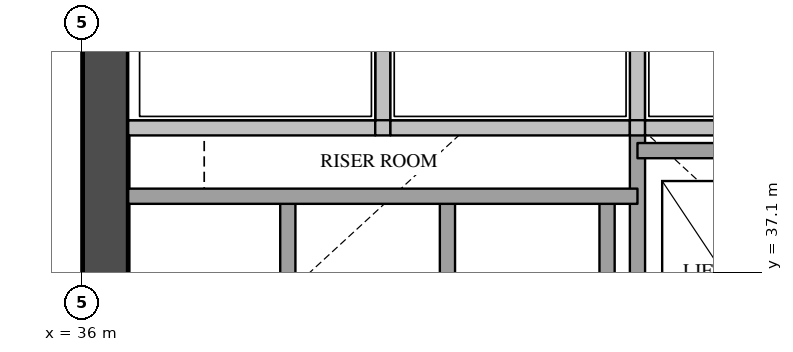
"""IFC4 building model, lengths in metres.
Left out: names, types, materials, properties, quantities, classifications, styles, units other than length and angle.
Written with IfcOpenShell. Run it as: python <this file> out.ifc"""

import sys

from ifc_helpers import new_model, si_unit, direction, frame, frame_2d, origin, place, context, subcontext, project, spatial, rectangle, extrude, element, save


model = new_model("IFC4")
c1 = context("Model", 3, precision=1e-05, world=origin(), true_north=direction((0.0, 1.0)))
c2 = subcontext(c1, "Body", "Model", "MODEL_VIEW")
j1 = project(units=[si_unit("LENGTHUNIT", "METRE"), si_unit("PLANEANGLEUNIT", "RADIAN")], contexts=[c1])
p1 = place(None, origin())
s1 = spatial("IfcSite", under=j1, at=p1, CompositionType="ELEMENT")
p2 = place(p1, origin())
s2 = spatial("IfcBuilding", under=s1, at=p2, CompositionType="ELEMENT")
p3 = place(p2, frame((0.0, 0.0, 89.2)))
s3 = spatial("IfcBuildingStorey", under=s2, at=p3, CompositionType="ELEMENT", Elevation=89.2)
p4 = place(p3, frame((36.3, 29.1, 0.0), z_axis=(0.0, 0.0, 1.0), x_axis=(0.0, 1.0, 0.0)))
e1 = element("IfcWall", 1, at=p4, inside=s3, PredefinedType="SHEAR", context=c2, shape_type="SweptSolid", body=[
    extrude(rectangle(XDim=20.3, YDim=0.6, at=frame_2d((10.15, 0.0))), origin(), (0.0, 0.0, 1.0), 3.5),
])
p5 = place(p4, frame((3.6, 0.0, 0.0)))
e2 = element("IfcOpeningElement", 2, at=p5, cuts=e1, PredefinedType="OPENING", context=c2, shape_type="SweptSolid", body=[
    extrude(rectangle(XDim=1.8, YDim=2.1, at=frame_2d((0.9, 1.05))), frame((0.0, 0.31, 0.0), z_axis=(0.0, -1.0, 0.0), x_axis=(1.0, 0.0, 0.0)), (0.0, 0.0, 1.0), 0.62),
])
p6 = place(p4, frame((16.4, 0.0, 0.0)))
e3 = element("IfcOpeningElement", 3, at=p6, cuts=e1, PredefinedType="OPENING", context=c2, shape_type="SweptSolid", body=[
    extrude(rectangle(XDim=1.0, YDim=2.1, at=frame_2d((0.5, 1.05))), frame((0.0, 0.31, 0.0), z_axis=(0.0, -1.0, 0.0), x_axis=(1.0, 0.0, 0.0)), (0.0, 0.0, 1.0), 0.62),
])
p7 = place(p3, frame((38.7, 34.9, 0.0), z_axis=(0.0, 0.0, 1.0), x_axis=(0.0, 1.0, 0.0)))
e4 = element("IfcWall", 4, at=p7, inside=s3, PredefinedType="SOLIDWALL", context=c2, shape_type="SweptSolid", body=[
    extrude(rectangle(XDim=3.2, YDim=0.2, at=frame_2d((1.6, 0.0))), origin(), (0.0, 0.0, 1.0), 3.5),
])
p8 = place(p3, frame((39.95, 39.0, 0.0), z_axis=(0.0, 0.0, 1.0), x_axis=(0.0, 1.0, 0.0)))
e5 = element("IfcWall", 5, at=p8, inside=s3, PredefinedType="SOLIDWALL", context=c2, shape_type="SweptSolid", body=[
    extrude(rectangle(XDim=1.78, YDim=0.2, at=frame_2d((0.89, 0.0))), origin(), (0.0, 0.0, 1.0), 3.5),
])
for number, where, z_axis, x_axis in (
    (6, (40.8, 34.9, 0.0), (0.0, 0.0, 1.0), (0.0, 1.0, 0.0)),
    (7, (42.9, 34.9, 0.0), (0.0, 0.0, 1.0), (0.0, 1.0, 0.0)),
):
    element("IfcWall", number, at=place(p3, frame(where, z_axis=z_axis, x_axis=x_axis)), inside=s3, PredefinedType="SOLIDWALL", context=c2, shape_type="SweptSolid", body=[
        extrude(rectangle(XDim=3.2, YDim=0.2, at=frame_2d((1.6, 0.0))), origin(), (0.0, 0.0, 1.0), 3.5),
    ])
p9 = place(p3, frame((43.3, 29.1, 0.0), z_axis=(0.0, 0.0, 1.0), x_axis=(0.0, 1.0, 0.0)))
e8 = element("IfcWall", 8, at=p9, inside=s3, PredefinedType="SOLIDWALL", context=c2, shape_type="SweptSolid", body=[
    extrude(rectangle(XDim=9.9, YDim=0.2, at=frame_2d((4.95, 0.0))), origin(), (0.0, 0.0, 1.0), 3.5),
])
p10 = place(p3, frame((43.3, 39.0, 0.0), z_axis=(0.0, 0.0, 1.0), x_axis=(0.0, 1.0, 0.0)))
e9 = element("IfcWall", 9, at=p10, inside=s3, PredefinedType="SOLIDWALL", context=c2, shape_type="SweptSolid", body=[
    extrude(rectangle(XDim=1.78, YDim=0.2, at=frame_2d((0.89, 0.0))), origin(), (0.0, 0.0, 1.0), 3.5),
])
p11 = place(p3, frame((36.6, 38.1, 0.0), z_axis=(0.0, 0.0, 1.0), x_axis=(1.0, 0.0, 0.0)))
e10 = element("IfcWall", 10, at=p11, inside=s3, PredefinedType="SOLIDWALL", context=c2, shape_type="SweptSolid", body=[
    extrude(rectangle(XDim=6.7, YDim=0.2, at=frame_2d((3.35, 0.0))), origin(), (0.0, 0.0, 1.0), 3.5),
])
p12 = place(p3, frame((43.3, 38.7, 0.0), z_axis=(0.0, 0.0, 1.0), x_axis=(1.0, 0.0, 0.0)))
e11 = element("IfcWall", 11, at=p12, inside=s3, PredefinedType="SOLIDWALL", context=c2, shape_type="SweptSolid", body=[
    extrude(rectangle(XDim=4.5, YDim=0.2, at=frame_2d((2.25, 0.0))), origin(), (0.0, 0.0, 1.0), 3.5),
])
p13 = place(p3, frame((36.6, 39.0, 0.0), z_axis=(0.0, 0.0, 1.0), x_axis=(1.0, 0.0, 0.0)))
e12 = element("IfcWall", 12, at=p13, inside=s3, PredefinedType="SOLIDWALL", context=c2, shape_type="SweptSolid", body=[
    extrude(rectangle(XDim=3.25, YDim=0.2, at=frame_2d((1.625, 0.0))), origin(), (0.0, 0.0, 1.0), 3.5),
])
p14 = place(p3, frame((39.85, 39.0, 0.0), z_axis=(0.0, 0.0, 1.0), x_axis=(1.0, 0.0, 0.0)))
e13 = element("IfcWall", 13, at=p14, inside=s3, PredefinedType="SOLIDWALL", context=c2, shape_type="SweptSolid", body=[
    extrude(rectangle(XDim=0.2, YDim=0.2, at=frame_2d((0.1, 0.0))), origin(), (0.0, 0.0, 1.0), 3.5),
])
p15 = place(p3, frame((40.05, 39.0, 0.0), z_axis=(0.0, 0.0, 1.0), x_axis=(1.0, 0.0, 0.0)))
e14 = element("IfcWall", 14, at=p15, inside=s3, PredefinedType="SOLIDWALL", context=c2, shape_type="SweptSolid", body=[
    extrude(rectangle(XDim=3.15, YDim=0.2, at=frame_2d((1.575, 0.0))), origin(), (0.0, 0.0, 1.0), 3.5),
])
p16 = place(p3, frame((43.2, 39.0, 0.0), z_axis=(0.0, 0.0, 1.0), x_axis=(1.0, 0.0, 0.0)))
e15 = element("IfcWall", 15, at=p16, inside=s3, PredefinedType="SOLIDWALL", context=c2, shape_type="SweptSolid", body=[
    extrude(rectangle(XDim=0.2, YDim=0.2, at=frame_2d((0.1, 0.0))), origin(), (0.0, 0.0, 1.0), 3.5),
])
p17 = place(p3, frame((43.4, 39.0, 0.0), z_axis=(0.0, 0.0, 1.0), x_axis=(1.0, 0.0, 0.0)))
e16 = element("IfcWall", 16, at=p17, inside=s3, PredefinedType="SOLIDWALL", context=c2, shape_type="SweptSolid", body=[
    extrude(rectangle(XDim=3.25, YDim=0.2, at=frame_2d((1.625, 0.0))), origin(), (0.0, 0.0, 1.0), 3.5),
])
save(model, sys.argv[1])
